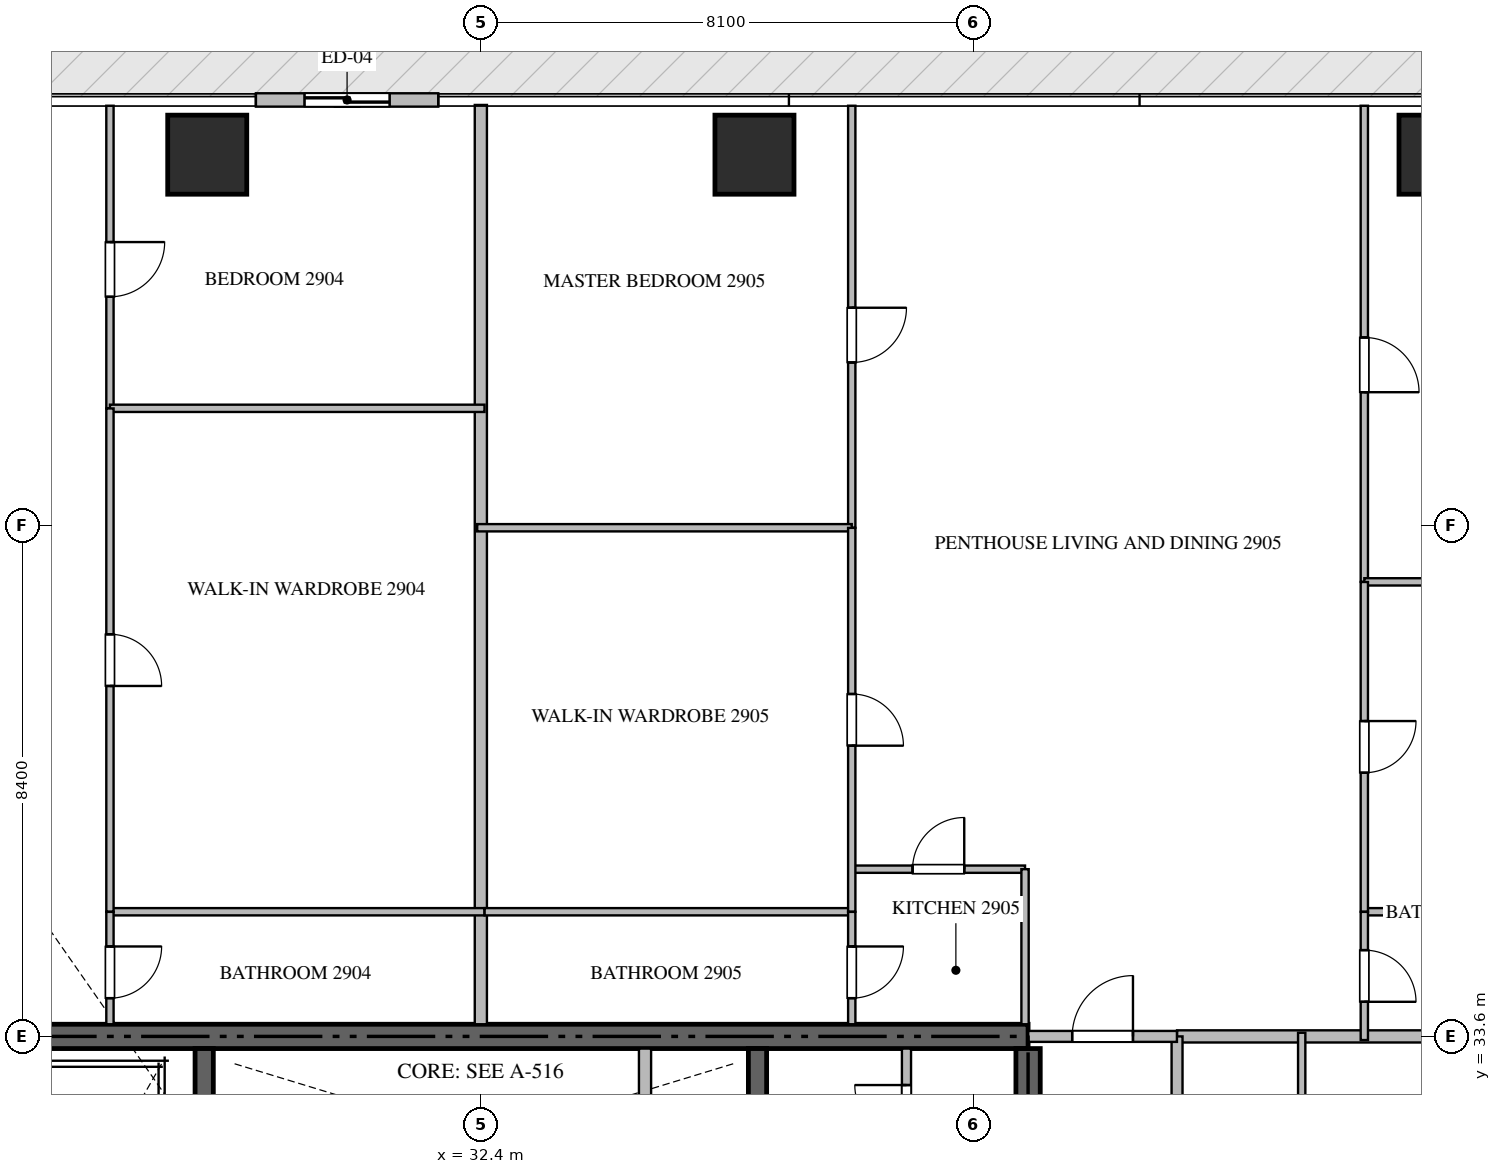
"""IFC4 building model, lengths in metres.
Left out: names, types, materials, properties, quantities, classifications, styles, units other than length and angle.
Written with IfcOpenShell. Run it as: python <this file> out.ifc"""

import sys

from ifc_helpers import new_model, si_unit, direction, frame, frame_2d, origin, origin_2d, place, context, subcontext, project, spatial, rectangle, extrude, source, transform, mapped, element, fill, save


model = new_model("IFC4")
c1 = context("Model", 3, precision=1e-05, world=origin(), true_north=direction((0.0, 1.0)))
c2 = subcontext(c1, "Body", "Model", "MODEL_VIEW")
j1 = project(units=[si_unit("LENGTHUNIT", "METRE"), si_unit("PLANEANGLEUNIT", "RADIAN")], contexts=[c1])
p1 = place(None, origin())
s1 = spatial("IfcSite", under=j1, at=p1, CompositionType="ELEMENT")
p2 = place(p1, origin())
s2 = spatial("IfcBuilding", under=s1, at=p2, CompositionType="ELEMENT")
p3 = place(p2, frame((0.0, 0.0, 120.15)))
s3 = spatial("IfcBuildingStorey", under=s2, at=p3, CompositionType="ELEMENT", Elevation=120.15)
p4 = place(p3, frame((41.4, 33.6, -0.44), z_axis=(0.0, 0.0, 1.0), x_axis=(-1.0, 0.0, 0.0)))
e1 = element("IfcWall", 1, at=p4, inside=s3, PredefinedType="SHEAR", context=c2, shape_type="SweptSolid", body=[
    extrude(rectangle(XDim=18.0, YDim=0.4, at=frame_2d((9.0, 0.0))), origin(), (0.0, 0.0, 1.0), 3.928),
])
p5 = place(p3, frame((41.4, 27.75, -0.44), z_axis=(0.0, 0.0, 1.0), x_axis=(0.0, 1.0, 0.0)))
e2 = element("IfcWall", 2, at=p5, inside=s3, PredefinedType="SHEAR", context=c2, shape_type="SweptSolid", body=[
    extrude(rectangle(XDim=5.65, YDim=0.4, at=frame_2d((2.825, 0.0))), origin(), (0.0, 0.0, 1.0), 3.928),
])
p6 = place(p3, frame((27.85, 23.55, -0.44), z_axis=(0.0, 0.0, 1.0), x_axis=(0.0, 1.0, 0.0)))
e3 = element("IfcWall", 3, at=p6, inside=s3, PredefinedType="SHEAR", context=c2, shape_type="SweptSolid", body=[
    extrude(rectangle(XDim=9.85, YDim=0.3, at=frame_2d((4.925, 0.0))), origin(), (0.0, 0.0, 1.0), 3.928),
])
p7 = place(p3, frame((36.95, 27.05, -0.44), z_axis=(0.0, 0.0, 1.0), x_axis=(0.0, 1.0, 0.0)))
e4 = element("IfcWall", 4, at=p7, inside=s3, PredefinedType="SHEAR", context=c2, shape_type="SweptSolid", body=[
    extrude(rectangle(XDim=6.35, YDim=0.3, at=frame_2d((3.175, 0.0))), origin(), (0.0, 0.0, 1.0), 3.928),
])
m1 = source(origin(), c2, "Body", "SweptSolid", [
    extrude(rectangle(XDim=1.3, YDim=1.3, at=origin_2d()), origin(), (0.0, 0.0, 1.0), 3.93),
])
for number, where, z_axis, x_axis in (
    (5, (27.9, 48.1, -0.44), (0.0, 0.0, 1.0), (1.0, 0.0, 0.0)),
    (6, (36.9, 48.1, -0.44), (0.0, 0.0, 1.0), (1.0, 0.0, 0.0)),
    (7, (48.15, 48.1, -0.44), (0.0, 0.0, 1.0), (1.0, 0.0, 0.0)),
):
    element("IfcColumn", number, at=place(p3, frame(where, z_axis=z_axis, x_axis=x_axis)), inside=s3, PredefinedType="COLUMN", context=c2, shape_type="MappedRepresentation", body=[
        mapped(m1, transform((0.0, 0.0, 0.0), scale=1.0)),
    ])
p8 = place(p3, frame((31.7, 49.0, 0.0), z_axis=(0.0, 0.0, 1.0), x_axis=(-1.0, 0.0, 0.0)))
e8 = element("IfcWall", 8, at=p8, inside=s3, PredefinedType="ELEMENTEDWALL", context=c2, shape_type="SweptSolid", body=[
    extrude(rectangle(XDim=3.0, YDim=0.22, at=frame_2d((1.5, 0.0))), origin(), (0.0, 0.0, 1.0), 3.475),
])
p9 = place(p8, frame((0.8, 0.0, 0.0)))
e9 = element("IfcOpeningElement", 9, at=p9, cuts=e8, PredefinedType="OPENING", context=c2, shape_type="SweptSolid", body=[
    extrude(rectangle(XDim=1.4, YDim=2.25, at=frame_2d((0.7, 1.125))), frame((0.0, 0.12, 0.0), z_axis=(0.0, -1.0, 0.0), x_axis=(1.0, 0.0, 0.0)), (0.0, 0.0, 1.0), 0.24),
])
p10 = place(p3, frame((35.1, 30.75, 0.0), z_axis=(0.0, 0.0, 1.0), x_axis=(0.0, 1.0, 0.0)))
e10 = element("IfcWall", 10, at=p10, inside=s3, PredefinedType="STANDARD", context=c2, shape_type="SweptSolid", body=[
    extrude(rectangle(XDim=2.65, YDim=0.2, at=frame_2d((1.325, 0.0))), origin(), (0.0, 0.0, 1.0), 3.49),
])
p11 = place(p3, frame((39.4, 31.35, 0.0), z_axis=(0.0, 0.0, 1.0), x_axis=(0.0, 1.0, 0.0)))
e11 = element("IfcWall", 11, at=p11, inside=s3, PredefinedType="PARTITIONING", context=c2, shape_type="SweptSolid", body=[
    extrude(rectangle(XDim=2.05, YDim=0.15, at=frame_2d((1.025, 0.0))), origin(), (0.0, 0.0, 1.0), 3.49),
])
p12 = place(p11, frame((0.6, 0.0, 0.0)))
e12 = element("IfcOpeningElement", 12, at=p12, cuts=e11, PredefinedType="OPENING", context=c2, shape_type="SweptSolid", body=[
    extrude(rectangle(XDim=0.85, YDim=2.1, at=frame_2d((0.425, 1.05))), frame((0.0, 0.085, 0.0), z_axis=(0.0, -1.0, 0.0), x_axis=(1.0, 0.0, 0.0)), (0.0, 0.0, 1.0), 0.17),
])
p13 = place(p3, frame((32.4, 33.8, 0.0), z_axis=(0.0, 0.0, 1.0), x_axis=(0.0, 1.0, 0.0)))
e13 = element("IfcWall", 13, at=p13, inside=s3, PredefinedType="PARTITIONING", context=c2, shape_type="SweptSolid", body=[
    extrude(rectangle(XDim=15.118, YDim=0.2, at=frame_2d((7.559, 0.0))), origin(), (0.0, 0.0, 1.0), 3.49),
])
p14 = place(p3, frame((43.85, 33.6, 0.0), z_axis=(0.0, 0.0, 1.0), x_axis=(1.0, 0.0, 0.0)))
e14 = element("IfcWall", 14, at=p14, inside=s3, PredefinedType="PARTITIONING", context=c2, shape_type="SweptSolid", body=[
    extrude(rectangle(XDim=13.068, YDim=0.2, at=frame_2d((6.534, 0.0))), origin(), (0.0, 0.0, 1.0), 3.49),
])
p15 = place(p3, frame((43.85, 14.9, 0.0), z_axis=(0.0, 0.0, 1.0), x_axis=(0.0, 1.0, 0.0)))
e15 = element("IfcWall", 15, at=p15, inside=s3, PredefinedType="PARTITIONING", context=c2, shape_type="SweptSolid", body=[
    extrude(rectangle(XDim=18.7, YDim=0.18, at=frame_2d((9.35, 0.0))), origin(), (0.0, 0.0, 1.0), 3.49),
])
p16 = place(p15, frame((1.805, 0.0, 0.0)))
e16 = element("IfcOpeningElement", 16, at=p16, cuts=e15, PredefinedType="OPENING", context=c2, shape_type="SweptSolid", body=[
    extrude(rectangle(XDim=1.0, YDim=2.15, at=frame_2d((0.5, 1.075))), frame((0.0, 0.1, 0.0), z_axis=(0.0, -1.0, 0.0), x_axis=(1.0, 0.0, 0.0)), (0.0, 0.0, 1.0), 0.2),
])
p17 = place(p15, frame((10.602, 0.0, 0.0)))
e17 = element("IfcOpeningElement", 17, at=p17, cuts=e15, PredefinedType="OPENING", context=c2, shape_type="SweptSolid", body=[
    extrude(rectangle(XDim=1.0, YDim=2.15, at=frame_2d((0.5, 1.075))), frame((0.0, 0.1, 0.0), z_axis=(0.0, -1.0, 0.0), x_axis=(1.0, 0.0, 0.0)), (0.0, 0.0, 1.0), 0.2),
])
p18 = place(p3, frame((41.402, 33.6, 0.0), z_axis=(0.0, 0.0, 1.0), x_axis=(1.0, 0.0, 0.0)))
e18 = element("IfcWall", 18, at=p18, inside=s3, PredefinedType="PARTITIONING", context=c2, shape_type="SweptSolid", body=[
    extrude(rectangle(XDim=2.446, YDim=0.18, at=frame_2d((1.223, 0.0))), origin(), (0.0, 0.0, 1.0), 3.49),
])
p19 = place(p18, frame((0.723, 0.0, 0.0)))
e19 = element("IfcOpeningElement", 19, at=p19, cuts=e18, PredefinedType="OPENING", context=c2, shape_type="SweptSolid", body=[
    extrude(rectangle(XDim=1.0, YDim=2.15, at=frame_2d((0.5, 1.075))), frame((0.0, 0.1, 0.0), z_axis=(0.0, -1.0, 0.0), x_axis=(1.0, 0.0, 0.0)), (0.0, 0.0, 1.0), 0.2),
])
p20 = place(p3, frame((26.3, 48.905, 0.0), z_axis=(0.0, 0.0, 1.0), x_axis=(0.0, -1.0, 0.0)))
e20 = element("IfcWall", 20, at=p20, inside=s3, PredefinedType="PARTITIONING", context=c2, shape_type="SweptSolid", body=[
    extrude(rectangle(XDim=4.976, YDim=0.12, at=frame_2d((2.488, 0.0))), origin(), (0.0, 0.0, 1.0), 3.49),
])
p21 = place(p20, frame((2.242, 0.0, 0.0)))
e21 = element("IfcOpeningElement", 21, at=p21, cuts=e20, PredefinedType="OPENING", context=c2, shape_type="SweptSolid", body=[
    extrude(rectangle(XDim=0.9, YDim=2.1, at=frame_2d((0.45, 1.05))), frame((0.0, 0.07, 0.0), z_axis=(0.0, -1.0, 0.0), x_axis=(1.0, 0.0, 0.0)), (0.0, 0.0, 1.0), 0.14),
])
for number, where, z_axis, x_axis in (
    (22, (26.3, 43.929, 0.0), (0.0, 0.0, 1.0), (1.0, 0.0, 0.0)),
    (23, (26.3, 35.65, 0.0), (0.0, 0.0, 1.0), (1.0, 0.0, 0.0)),
):
    element("IfcWall", number, at=place(p3, frame(where, z_axis=z_axis, x_axis=x_axis)), inside=s3, PredefinedType="PARTITIONING", context=c2, shape_type="SweptSolid", body=[
        extrude(rectangle(XDim=6.16, YDim=0.12, at=frame_2d((3.08, 0.0))), origin(), (0.0, 0.0, 1.0), 3.49),
    ])
p22 = place(p3, frame((26.3, 43.927, 0.0), z_axis=(0.0, 0.0, 1.0), x_axis=(0.0, -1.0, 0.0)))
e24 = element("IfcWall", 24, at=p22, inside=s3, PredefinedType="PARTITIONING", context=c2, shape_type="SweptSolid", body=[
    extrude(rectangle(XDim=8.277, YDim=0.12, at=frame_2d((4.139, 0.0))), origin(), (0.0, 0.0, 1.0), 3.49),
])
p23 = place(p22, frame((3.714, 0.0, 0.0)))
e25 = element("IfcOpeningElement", 25, at=p23, cuts=e24, PredefinedType="OPENING", context=c2, shape_type="SweptSolid", body=[
    extrude(rectangle(XDim=0.85, YDim=2.1, at=frame_2d((0.425, 1.05))), frame((0.0, 0.07, 0.0), z_axis=(0.0, -1.0, 0.0), x_axis=(1.0, 0.0, 0.0)), (0.0, 0.0, 1.0), 0.14),
])
p24 = place(p3, frame((26.3, 35.648, 0.0), z_axis=(0.0, 0.0, 1.0), x_axis=(0.0, -1.0, 0.0)))
e26 = element("IfcWall", 26, at=p24, inside=s3, PredefinedType="PARTITIONING", context=c2, shape_type="SweptSolid", body=[
    extrude(rectangle(XDim=1.848, YDim=0.12, at=frame_2d((0.924, 0.0))), origin(), (0.0, 0.0, 1.0), 3.49),
])
p25 = place(p24, frame((0.569, 0.0, 0.0)))
e27 = element("IfcOpeningElement", 27, at=p25, cuts=e26, PredefinedType="OPENING", context=c2, shape_type="SweptSolid", body=[
    extrude(rectangle(XDim=0.85, YDim=2.1, at=frame_2d((0.425, 1.05))), frame((0.0, 0.07, 0.0), z_axis=(0.0, -1.0, 0.0), x_axis=(1.0, 0.0, 0.0)), (0.0, 0.0, 1.0), 0.14),
])
p26 = place(p3, frame((38.5, 36.35, 0.0), z_axis=(0.0, 0.0, 1.0), x_axis=(1.0, 0.0, 0.0)))
e28 = element("IfcWall", 28, at=p26, inside=s3, PredefinedType="PARTITIONING", context=c2, shape_type="SweptSolid", body=[
    extrude(rectangle(XDim=2.85, YDim=0.12, at=frame_2d((1.425, 0.0))), origin(), (0.0, 0.0, 1.0), 3.49),
])
p27 = place(p26, frame((1.0, 0.0, 0.0)))
e29 = element("IfcOpeningElement", 29, at=p27, cuts=e28, PredefinedType="OPENING", context=c2, shape_type="SweptSolid", body=[
    extrude(rectangle(XDim=0.85, YDim=2.1, at=frame_2d((0.425, 1.05))), frame((0.0, 0.07, 0.0), z_axis=(0.0, -1.0, 0.0), x_axis=(1.0, 0.0, 0.0)), (0.0, 0.0, 1.0), 0.14),
])
p28 = place(p3, frame((41.35, 36.35, 0.0), z_axis=(0.0, 0.0, 1.0), x_axis=(0.0, -1.0, 0.0)))
e30 = element("IfcWall", 30, at=p28, inside=s3, PredefinedType="PARTITIONING", context=c2, shape_type="SweptSolid", body=[
    extrude(rectangle(XDim=2.55, YDim=0.12, at=frame_2d((1.275, 0.0))), origin(), (0.0, 0.0, 1.0), 3.49),
])
p29 = place(p3, frame((38.5, 48.905, 0.0), z_axis=(0.0, 0.0, 1.0), x_axis=(0.0, -1.0, 0.0)))
e31 = element("IfcWall", 31, at=p29, inside=s3, PredefinedType="PARTITIONING", context=c2, shape_type="SweptSolid", body=[
    extrude(rectangle(XDim=6.94, YDim=0.12, at=frame_2d((3.47, 0.0))), origin(), (0.0, 0.0, 1.0), 3.49),
])
p30 = place(p29, frame((3.322, 0.0, 0.0)))
e32 = element("IfcOpeningElement", 32, at=p30, cuts=e31, PredefinedType="OPENING", context=c2, shape_type="SweptSolid", body=[
    extrude(rectangle(XDim=0.9, YDim=2.1, at=frame_2d((0.45, 1.05))), frame((0.0, 0.07, 0.0), z_axis=(0.0, -1.0, 0.0), x_axis=(1.0, 0.0, 0.0)), (0.0, 0.0, 1.0), 0.14),
])
p31 = place(p3, frame((32.34, 41.965, 0.0), z_axis=(0.0, 0.0, 1.0), x_axis=(1.0, 0.0, 0.0)))
e33 = element("IfcWall", 33, at=p31, inside=s3, PredefinedType="PARTITIONING", context=c2, shape_type="SweptSolid", body=[
    extrude(rectangle(XDim=6.16, YDim=0.12, at=frame_2d((3.08, 0.0))), origin(), (0.0, 0.0, 1.0), 3.49),
])
p32 = place(p3, frame((32.462, 35.65, 0.0), z_axis=(0.0, 0.0, 1.0), x_axis=(1.0, 0.0, 0.0)))
e34 = element("IfcWall", 34, at=p32, inside=s3, PredefinedType="PARTITIONING", context=c2, shape_type="SweptSolid", body=[
    extrude(rectangle(XDim=6.038, YDim=0.12, at=frame_2d((3.019, 0.0))), origin(), (0.0, 0.0, 1.0), 3.49),
])
p33 = place(p3, frame((38.5, 41.963, 0.0), z_axis=(0.0, 0.0, 1.0), x_axis=(0.0, -1.0, 0.0)))
e35 = element("IfcWall", 35, at=p33, inside=s3, PredefinedType="PARTITIONING", context=c2, shape_type="SweptSolid", body=[
    extrude(rectangle(XDim=6.313, YDim=0.12, at=frame_2d((3.156, 0.0))), origin(), (0.0, 0.0, 1.0), 3.49),
])
p34 = place(p33, frame((2.732, 0.0, 0.0)))
e36 = element("IfcOpeningElement", 36, at=p34, cuts=e35, PredefinedType="OPENING", context=c2, shape_type="SweptSolid", body=[
    extrude(rectangle(XDim=0.85, YDim=2.1, at=frame_2d((0.425, 1.05))), frame((0.0, 0.07, 0.0), z_axis=(0.0, -1.0, 0.0), x_axis=(1.0, 0.0, 0.0)), (0.0, 0.0, 1.0), 0.14),
])
p35 = place(p3, frame((38.5, 35.648, 0.0), z_axis=(0.0, 0.0, 1.0), x_axis=(0.0, -1.0, 0.0)))
e37 = element("IfcWall", 37, at=p35, inside=s3, PredefinedType="PARTITIONING", context=c2, shape_type="SweptSolid", body=[
    extrude(rectangle(XDim=1.848, YDim=0.12, at=frame_2d((0.924, 0.0))), origin(), (0.0, 0.0, 1.0), 3.49),
])
p36 = place(p35, frame((0.569, 0.0, 0.0)))
e38 = element("IfcOpeningElement", 38, at=p36, cuts=e37, PredefinedType="OPENING", context=c2, shape_type="SweptSolid", body=[
    extrude(rectangle(XDim=0.85, YDim=2.1, at=frame_2d((0.425, 1.05))), frame((0.0, 0.07, 0.0), z_axis=(0.0, -1.0, 0.0), x_axis=(1.0, 0.0, 0.0)), (0.0, 0.0, 1.0), 0.14),
])
p37 = place(p3, frame((46.93, 48.905, 0.0), z_axis=(0.0, 0.0, 1.0), x_axis=(0.0, -1.0, 0.0)))
e39 = element("IfcWall", 39, at=p37, inside=s3, PredefinedType="PARTITIONING", context=c2, shape_type="SweptSolid", body=[
    extrude(rectangle(XDim=7.83, YDim=0.12, at=frame_2d((3.915, 0.0))), origin(), (0.0, 0.0, 1.0), 3.49),
])
p38 = place(p37, frame((3.811, 0.0, 0.0)))
e40 = element("IfcOpeningElement", 40, at=p38, cuts=e39, PredefinedType="OPENING", context=c2, shape_type="SweptSolid", body=[
    extrude(rectangle(XDim=0.9, YDim=2.1, at=frame_2d((0.45, 1.05))), frame((0.0, 0.07, 0.0), z_axis=(0.0, -1.0, 0.0), x_axis=(1.0, 0.0, 0.0)), (0.0, 0.0, 1.0), 0.14),
])
p39 = place(p3, frame((46.93, 41.075, 0.0), z_axis=(0.0, 0.0, 1.0), x_axis=(1.0, 0.0, 0.0)))
e41 = element("IfcWall", 41, at=p39, inside=s3, PredefinedType="PARTITIONING", context=c2, shape_type="SweptSolid", body=[
    extrude(rectangle(XDim=5.975, YDim=0.12, at=frame_2d((2.988, 0.0))), origin(), (0.0, 0.0, 1.0), 3.49),
])
p40 = place(p3, frame((46.93, 35.65, 0.0), z_axis=(0.0, 0.0, 1.0), x_axis=(1.0, 0.0, 0.0)))
e42 = element("IfcWall", 42, at=p40, inside=s3, PredefinedType="PARTITIONING", context=c2, shape_type="SweptSolid", body=[
    extrude(rectangle(XDim=3.2, YDim=0.12, at=frame_2d((1.6, 0.0))), origin(), (0.0, 0.0, 1.0), 3.49),
])
p41 = place(p3, frame((46.93, 41.073, 0.0), z_axis=(0.0, 0.0, 1.0), x_axis=(0.0, -1.0, 0.0)))
e43 = element("IfcWall", 43, at=p41, inside=s3, PredefinedType="PARTITIONING", context=c2, shape_type="SweptSolid", body=[
    extrude(rectangle(XDim=5.423, YDim=0.12, at=frame_2d((2.711, 0.0))), origin(), (0.0, 0.0, 1.0), 3.49),
])
p42 = place(p41, frame((2.287, 0.0, 0.0)))
e44 = element("IfcOpeningElement", 44, at=p42, cuts=e43, PredefinedType="OPENING", context=c2, shape_type="SweptSolid", body=[
    extrude(rectangle(XDim=0.85, YDim=2.1, at=frame_2d((0.425, 1.05))), frame((0.0, 0.07, 0.0), z_axis=(0.0, -1.0, 0.0), x_axis=(1.0, 0.0, 0.0)), (0.0, 0.0, 1.0), 0.14),
])
p43 = place(p3, frame((46.93, 35.648, 0.0), z_axis=(0.0, 0.0, 1.0), x_axis=(0.0, -1.0, 0.0)))
e45 = element("IfcWall", 45, at=p43, inside=s3, PredefinedType="PARTITIONING", context=c2, shape_type="SweptSolid", body=[
    extrude(rectangle(XDim=2.108, YDim=0.12, at=frame_2d((1.054, 0.0))), origin(), (0.0, 0.0, 1.0), 3.49),
])
p44 = place(p43, frame((0.629, 0.0, 0.0)))
e46 = element("IfcOpeningElement", 46, at=p44, cuts=e45, PredefinedType="OPENING", context=c2, shape_type="SweptSolid", body=[
    extrude(rectangle(XDim=0.85, YDim=2.1, at=frame_2d((0.425, 1.05))), frame((0.0, 0.07, 0.0), z_axis=(0.0, -1.0, 0.0), x_axis=(1.0, 0.0, 0.0)), (0.0, 0.0, 1.0), 0.14),
])
p45 = place(p3, frame((45.9, 27.8, 0.0), z_axis=(0.0, 0.0, 1.0), x_axis=(0.0, 1.0, 0.0)))
e47 = element("IfcWall", 47, at=p45, inside=s3, PredefinedType="PARTITIONING", context=c2, shape_type="SweptSolid", body=[
    extrude(rectangle(XDim=5.86, YDim=0.12, at=frame_2d((2.93, 0.0))), origin(), (0.0, 0.0, 1.0), 3.49),
])
m2 = source(origin(), c2, "Body", "SweptSolid", [
    extrude(rectangle(XDim=1.4, YDim=2.25, at=frame_2d((0.7, 1.125))), frame((0.0, 0.025, 0.0), z_axis=(0.0, -1.0, 0.0), x_axis=(1.0, 0.0, 0.0)), (0.0, 0.0, 1.0), 0.05),
])
p46 = place(p9, origin())
e48 = element("IfcDoor", 48, at=p46, inside=s3, OperationType="SLIDING_TO_LEFT", PredefinedType="DOOR", context=c2, shape_type="MappedRepresentation", body=[
    mapped(m2, transform((0.0, 0.0, 0.0), scale=1.0)),
])
fill(e9, e48)
m3 = source(origin(), c2, "Body", "SweptSolid", [
    extrude(rectangle(XDim=0.85, YDim=2.1, at=frame_2d((0.425, 1.05))), frame((0.0, 0.025, 0.0), z_axis=(0.0, -1.0, 0.0), x_axis=(1.0, 0.0, 0.0)), (0.0, 0.0, 1.0), 0.05),
])
p47 = place(p12, origin())
e49 = element("IfcDoor", 49, at=p47, inside=s3, OperationType="SINGLE_SWING_RIGHT", PredefinedType="DOOR", context=c2, shape_type="MappedRepresentation", body=[
    mapped(m3, transform((0.0, 0.0, 0.0), scale=1.0)),
])
fill(e12, e49)
m4 = source(origin(), c2, "Body", "SweptSolid", [
    extrude(rectangle(XDim=1.0, YDim=2.15, at=frame_2d((0.5, 1.075))), frame((0.0, 0.025, 0.0), z_axis=(0.0, -1.0, 0.0), x_axis=(1.0, 0.0, 0.0)), (0.0, 0.0, 1.0), 0.05),
])
p48 = place(p19, origin())
e50 = element("IfcDoor", 50, at=p48, inside=s3, OperationType="SINGLE_SWING_RIGHT", PredefinedType="DOOR", context=c2, shape_type="MappedRepresentation", body=[
    mapped(m4, transform((0.0, 0.0, 0.0), scale=1.0)),
])
fill(e19, e50)
m5 = source(origin(), c2, "Body", "SweptSolid", [
    extrude(rectangle(XDim=0.9, YDim=2.1, at=frame_2d((0.45, 1.05))), frame((0.0, 0.025, 0.0), z_axis=(0.0, -1.0, 0.0), x_axis=(1.0, 0.0, 0.0)), (0.0, 0.0, 1.0), 0.05),
])
p49 = place(p21, origin())
e51 = element("IfcDoor", 51, at=p49, inside=s3, OperationType="SINGLE_SWING_LEFT", PredefinedType="DOOR", context=c2, shape_type="MappedRepresentation", body=[
    mapped(m5, transform((0.0, 0.0, 0.0), scale=1.0)),
])
fill(e21, e51)
p50 = place(p23, origin())
e52 = element("IfcDoor", 52, at=p50, inside=s3, OperationType="SINGLE_SWING_RIGHT", PredefinedType="DOOR", context=c2, shape_type="MappedRepresentation", body=[
    mapped(m3, transform((0.0, 0.0, 0.0), scale=1.0)),
])
fill(e25, e52)
p51 = place(p25, origin())
e53 = element("IfcDoor", 53, at=p51, inside=s3, OperationType="SINGLE_SWING_LEFT", PredefinedType="DOOR", context=c2, shape_type="MappedRepresentation", body=[
    mapped(m3, transform((0.0, 0.0, 0.0), scale=1.0)),
])
fill(e27, e53)
p52 = place(p27, origin())
e54 = element("IfcDoor", 54, at=p52, inside=s3, OperationType="SINGLE_SWING_RIGHT", PredefinedType="DOOR", context=c2, shape_type="MappedRepresentation", body=[
    mapped(m3, transform((0.0, 0.0, 0.0), scale=1.0)),
])
fill(e29, e54)
p53 = place(p30, origin())
e55 = element("IfcDoor", 55, at=p53, inside=s3, OperationType="SINGLE_SWING_LEFT", PredefinedType="DOOR", context=c2, shape_type="MappedRepresentation", body=[
    mapped(m5, transform((0.0, 0.0, 0.0), scale=1.0)),
])
fill(e32, e55)
p54 = place(p34, origin())
e56 = element("IfcDoor", 56, at=p54, inside=s3, OperationType="SINGLE_SWING_RIGHT", PredefinedType="DOOR", context=c2, shape_type="MappedRepresentation", body=[
    mapped(m3, transform((0.0, 0.0, 0.0), scale=1.0)),
])
fill(e36, e56)
p55 = place(p36, origin())
e57 = element("IfcDoor", 57, at=p55, inside=s3, OperationType="SINGLE_SWING_LEFT", PredefinedType="DOOR", context=c2, shape_type="MappedRepresentation", body=[
    mapped(m3, transform((0.0, 0.0, 0.0), scale=1.0)),
])
fill(e38, e57)
p56 = place(p38, origin())
e58 = element("IfcDoor", 58, at=p56, inside=s3, OperationType="SINGLE_SWING_RIGHT", PredefinedType="DOOR", context=c2, shape_type="MappedRepresentation", body=[
    mapped(m5, transform((0.0, 0.0, 0.0), scale=1.0)),
])
fill(e40, e58)
p57 = place(p42, origin())
e59 = element("IfcDoor", 59, at=p57, inside=s3, OperationType="SINGLE_SWING_LEFT", PredefinedType="DOOR", context=c2, shape_type="MappedRepresentation", body=[
    mapped(m3, transform((0.0, 0.0, 0.0), scale=1.0)),
])
fill(e44, e59)
p58 = place(p44, origin())
e60 = element("IfcDoor", 60, at=p58, inside=s3, OperationType="SINGLE_SWING_RIGHT", PredefinedType="DOOR", context=c2, shape_type="MappedRepresentation", body=[
    mapped(m3, transform((0.0, 0.0, 0.0), scale=1.0)),
])
fill(e46, e60)
save(model, sys.argv[1])
